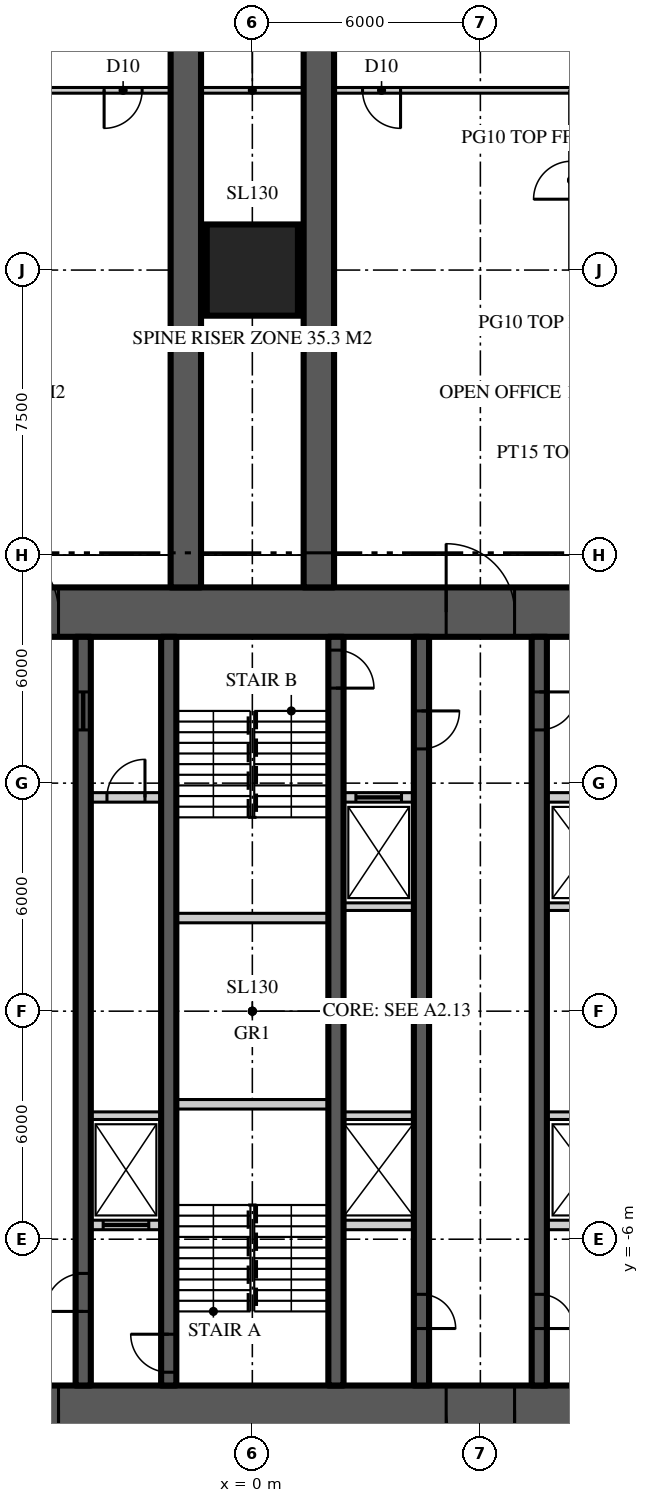
"""IFC4 building model, lengths in metres.
Left out: names, types, materials, properties, quantities, classifications, styles, units other than length and angle.
Written with IfcOpenShell. Run it as: python <this file> out.ifc"""

import sys

from ifc_helpers import new_model, si_unit, direction, frame, frame_2d, origin, origin_2d, place, context, subcontext, project, spatial, rectangle, extrude, element, fill, save


model = new_model("IFC4")
c1 = context("Model", 3, precision=1e-05, world=origin(), true_north=direction((0.0, 1.0)))
c2 = subcontext(c1, "Body", "Model", "MODEL_VIEW")
j1 = project(units=[si_unit("LENGTHUNIT", "METRE"), si_unit("PLANEANGLEUNIT", "RADIAN")], contexts=[c1])
p1 = place(None, origin())
s1 = spatial("IfcSite", under=j1, at=p1, CompositionType="ELEMENT")
p2 = place(p1, origin())
s2 = spatial("IfcBuilding", under=s1, at=p2, CompositionType="ELEMENT")
p3 = place(p2, frame((0.0, 0.0, 86.4)))
s3 = spatial("IfcBuildingStorey", under=s2, at=p3, CompositionType="ELEMENT", Elevation=86.4)
p4 = place(p3, frame((-11.15, 10.5, 0.0), z_axis=(0.0, 0.0, 1.0), x_axis=(1.0, 0.0, 0.0)))
e1 = element("IfcWall", 1, at=p4, inside=s3, PredefinedType="SHEAR", context=c2, shape_type="SweptSolid", body=[
    extrude(rectangle(XDim=22.3, YDim=1.3, at=frame_2d((11.15, 0.0))), origin(), (0.0, 0.0, 1.0), 3.9),
])
p5 = place(p4, frame((4.25, 0.0, 0.0)))
e2 = element("IfcOpeningElement", 2, at=p5, cuts=e1, PredefinedType="OPENING", context=c2, shape_type="SweptSolid", body=[
    extrude(rectangle(XDim=1.8, YDim=2.2, at=frame_2d((0.9, 1.1))), frame((0.0, 0.66, 0.0), z_axis=(0.0, -1.0, 0.0), x_axis=(1.0, 0.0, 0.0)), (0.0, 0.0, 1.0), 1.32),
])
p6 = place(p4, frame((16.25, 0.0, 0.0)))
e3 = element("IfcOpeningElement", 3, at=p6, cuts=e1, PredefinedType="OPENING", context=c2, shape_type="SweptSolid", body=[
    extrude(rectangle(XDim=1.8, YDim=2.2, at=frame_2d((0.9, 1.1))), frame((0.0, 0.66, 0.0), z_axis=(0.0, -1.0, 0.0), x_axis=(1.0, 0.0, 0.0)), (0.0, 0.0, 1.0), 1.32),
])
p7 = place(p3, frame((11.15, -10.5, 0.0), z_axis=(0.0, 0.0, 1.0), x_axis=(-1.0, 0.0, 0.0)))
e4 = element("IfcWall", 4, at=p7, inside=s3, PredefinedType="SHEAR", context=c2, shape_type="SweptSolid", body=[
    extrude(rectangle(XDim=22.3, YDim=1.3, at=frame_2d((11.15, 0.0))), origin(), (0.0, 0.0, 1.0), 3.9),
])
p8 = place(p7, frame((16.25, 0.0, 0.0)))
e5 = element("IfcOpeningElement", 5, at=p8, cuts=e4, PredefinedType="OPENING", context=c2, shape_type="SweptSolid", body=[
    extrude(rectangle(XDim=1.8, YDim=2.2, at=frame_2d((0.9, 1.1))), frame((0.0, 0.66, 0.0), z_axis=(0.0, -1.0, 0.0), x_axis=(1.0, 0.0, 0.0)), (0.0, 0.0, 1.0), 1.32),
])
p9 = place(p7, frame((4.25, 0.0, 0.0)))
e6 = element("IfcOpeningElement", 6, at=p9, cuts=e4, PredefinedType="OPENING", context=c2, shape_type="SweptSolid", body=[
    extrude(rectangle(XDim=1.8, YDim=2.2, at=frame_2d((0.9, 1.1))), frame((0.0, 0.66, 0.0), z_axis=(0.0, -1.0, 0.0), x_axis=(1.0, 0.0, 0.0)), (0.0, 0.0, 1.0), 1.32),
])
for number, where, z_axis, x_axis in (
    (7, (1.75, 11.15, 0.0), (0.0, 0.0, 1.0), (0.0, 1.0, 0.0)),
    (8, (-1.75, 11.15, 0.0), (0.0, 0.0, 1.0), (0.0, 1.0, 0.0)),
):
    element("IfcWall", number, at=place(p3, frame(where, z_axis=z_axis, x_axis=x_axis)), inside=s3, PredefinedType="SHEAR", context=c2, shape_type="SweptSolid", body=[
        extrude(rectangle(XDim=15.25, YDim=0.8, at=frame_2d((7.625, 0.0))), origin(), (0.0, 0.0, 1.0), 3.9),
    ])
p10 = place(p3, frame((0.0, 19.5, 0.0), z_axis=(0.0, 0.0, 1.0), x_axis=(1.0, 0.0, 0.0)))
e9 = element("IfcColumn", 9, at=p10, inside=s3, PredefinedType="COLUMN", context=c2, shape_type="SweptSolid", body=[
    extrude(rectangle(XDim=2.4, YDim=2.4, at=origin_2d()), origin(), (0.0, 0.0, 1.0), 3.9),
])
p11 = place(p3, frame((7.55, 9.85, 0.0), z_axis=(0.0, 0.0, 1.0), x_axis=(0.0, -1.0, 0.0)))
e10 = element("IfcWall", 10, at=p11, inside=s3, PredefinedType="SHEAR", context=c2, shape_type="SweptSolid", body=[
    extrude(rectangle(XDim=19.7, YDim=0.4, at=frame_2d((9.85, 0.0))), origin(), (0.0, 0.0, 1.0), 3.9),
])
p12 = place(p11, frame((1.45, 0.0, 0.0)))
e11 = element("IfcOpeningElement", 11, at=p12, cuts=e10, PredefinedType="OPENING", context=c2, shape_type="SweptSolid", body=[
    extrude(rectangle(XDim=1.0, YDim=2.2, at=frame_2d((0.5, 1.1))), frame((0.0, 0.21, 0.0), z_axis=(0.0, -1.0, 0.0), x_axis=(1.0, 0.0, 0.0)), (0.0, 0.0, 1.0), 0.42),
])
p13 = place(p11, frame((17.3, 0.0, 0.0)))
e12 = element("IfcOpeningElement", 12, at=p13, cuts=e10, PredefinedType="OPENING", context=c2, shape_type="SweptSolid", body=[
    extrude(rectangle(XDim=0.9, YDim=2.1, at=frame_2d((0.45, 1.05))), frame((0.0, 0.21, 0.0), z_axis=(0.0, -1.0, 0.0), x_axis=(1.0, 0.0, 0.0)), (0.0, 0.0, 1.0), 0.42),
])
p14 = place(p3, frame((-4.45, -9.85, 0.0), z_axis=(0.0, 0.0, 1.0), x_axis=(0.0, 1.0, 0.0)))
e13 = element("IfcWall", 13, at=p14, inside=s3, PredefinedType="SHEAR", context=c2, shape_type="SweptSolid", body=[
    extrude(rectangle(XDim=19.7, YDim=0.4, at=frame_2d((9.85, 0.0))), origin(), (0.0, 0.0, 1.0), 3.9),
])
p15 = place(p14, frame((1.95, 0.0, 0.0)))
e14 = element("IfcOpeningElement", 14, at=p15, cuts=e13, PredefinedType="OPENING", context=c2, shape_type="SweptSolid", body=[
    extrude(rectangle(XDim=1.0, YDim=2.2, at=frame_2d((0.5, 1.1))), frame((0.0, 0.21, 0.0), z_axis=(0.0, -1.0, 0.0), x_axis=(1.0, 0.0, 0.0)), (0.0, 0.0, 1.0), 0.42),
])
p16 = place(p14, frame((17.25, 0.0, 0.0)))
e15 = element("IfcOpeningElement", 15, at=p16, cuts=e13, PredefinedType="OPENING", context=c2, shape_type="SweptSolid", body=[
    extrude(rectangle(XDim=1.0, YDim=2.1, at=frame_2d((0.5, 1.05))), frame((0.0, 0.21, 0.0), z_axis=(0.0, -1.0, 0.0), x_axis=(1.0, 0.0, 0.0)), (0.0, 0.0, 1.0), 0.42),
])
p17 = place(p3, frame((4.45, 9.85, 0.0), z_axis=(0.0, 0.0, 1.0), x_axis=(0.0, -1.0, 0.0)))
e16 = element("IfcWall", 16, at=p17, inside=s3, PredefinedType="SHEAR", context=c2, shape_type="SweptSolid", body=[
    extrude(rectangle(XDim=19.7, YDim=0.4, at=frame_2d((9.85, 0.0))), origin(), (0.0, 0.0, 1.0), 3.9),
])
p18 = place(p17, frame((1.95, 0.0, 0.0)))
e17 = element("IfcOpeningElement", 17, at=p18, cuts=e16, PredefinedType="OPENING", context=c2, shape_type="SweptSolid", body=[
    extrude(rectangle(XDim=1.0, YDim=2.2, at=frame_2d((0.5, 1.1))), frame((0.0, 0.21, 0.0), z_axis=(0.0, -1.0, 0.0), x_axis=(1.0, 0.0, 0.0)), (0.0, 0.0, 1.0), 0.42),
])
p19 = place(p17, frame((17.3, 0.0, 0.0)))
e18 = element("IfcOpeningElement", 18, at=p19, cuts=e16, PredefinedType="OPENING", context=c2, shape_type="SweptSolid", body=[
    extrude(rectangle(XDim=0.9, YDim=2.1, at=frame_2d((0.45, 1.05))), frame((0.0, 0.21, 0.0), z_axis=(0.0, -1.0, 0.0), x_axis=(1.0, 0.0, 0.0)), (0.0, 0.0, 1.0), 0.42),
])
p20 = place(p3, frame((-2.2, -9.85, 0.0), z_axis=(0.0, 0.0, 1.0), x_axis=(0.0, 1.0, 0.0)))
e19 = element("IfcWall", 19, at=p20, inside=s3, PredefinedType="SHEAR", context=c2, shape_type="SweptSolid", body=[
    extrude(rectangle(XDim=19.7, YDim=0.4, at=frame_2d((9.85, 0.0))), origin(), (0.0, 0.0, 1.0), 3.9),
])
p21 = place(p20, frame((0.35, 0.0, 0.0)))
e20 = element("IfcOpeningElement", 20, at=p21, cuts=e19, PredefinedType="OPENING", context=c2, shape_type="SweptSolid", body=[
    extrude(rectangle(XDim=1.0, YDim=2.2, at=frame_2d((0.5, 1.1))), frame((0.0, 0.21, 0.0), z_axis=(0.0, -1.0, 0.0), x_axis=(1.0, 0.0, 0.0)), (0.0, 0.0, 1.0), 0.42),
])
p22 = place(p3, frame((2.2, 9.85, 0.0), z_axis=(0.0, 0.0, 1.0), x_axis=(0.0, -1.0, 0.0)))
e21 = element("IfcWall", 21, at=p22, inside=s3, PredefinedType="SHEAR", context=c2, shape_type="SweptSolid", body=[
    extrude(rectangle(XDim=19.7, YDim=0.4, at=frame_2d((9.85, 0.0))), origin(), (0.0, 0.0, 1.0), 3.9),
])
p23 = place(p22, frame((0.35, 0.0, 0.0)))
e22 = element("IfcOpeningElement", 22, at=p23, cuts=e21, PredefinedType="OPENING", context=c2, shape_type="SweptSolid", body=[
    extrude(rectangle(XDim=1.0, YDim=2.2, at=frame_2d((0.5, 1.1))), frame((0.0, 0.21, 0.0), z_axis=(0.0, -1.0, 0.0), x_axis=(1.0, 0.0, 0.0)), (0.0, 0.0, 1.0), 0.42),
])
p24 = place(p3, frame((-4.25, 5.625, 0.0), z_axis=(0.0, 0.0, 1.0), x_axis=(1.0, 0.0, 0.0)))
e23 = element("IfcWall", 23, at=p24, inside=s3, PredefinedType="SOLIDWALL", context=c2, shape_type="SweptSolid", body=[
    extrude(rectangle(XDim=1.85, YDim=0.25, at=frame_2d((0.925, 0.0))), origin(), (0.0, 0.0, 1.0), 3.7),
])
p25 = place(p24, frame((0.425, 0.0, 0.0)))
e24 = element("IfcOpeningElement", 24, at=p25, cuts=e23, PredefinedType="OPENING", context=c2, shape_type="SweptSolid", body=[
    extrude(rectangle(XDim=1.0, YDim=2.2, at=frame_2d((0.5, 1.1))), frame((0.0, 0.135, 0.0), z_axis=(0.0, -1.0, 0.0), x_axis=(1.0, 0.0, 0.0)), (0.0, 0.0, 1.0), 0.27),
])
p26 = place(p3, frame((2.4, 5.625, 0.0), z_axis=(0.0, 0.0, 1.0), x_axis=(1.0, 0.0, 0.0)))
e25 = element("IfcWall", 25, at=p26, inside=s3, PredefinedType="SOLIDWALL", context=c2, shape_type="SweptSolid", body=[
    extrude(rectangle(XDim=1.85, YDim=0.25, at=frame_2d((0.925, 0.0))), origin(), (0.0, 0.0, 1.0), 3.7),
])
p27 = place(p26, frame((0.325, 0.0, 0.0)))
e26 = element("IfcOpeningElement", 26, at=p27, cuts=e25, PredefinedType="OPENING", context=c2, shape_type="SweptSolid", body=[
    extrude(rectangle(XDim=1.2, YDim=2.2, at=frame_2d((0.6, 1.1))), frame((0.0, 0.135, 0.0), z_axis=(0.0, -1.0, 0.0), x_axis=(1.0, 0.0, 0.0)), (0.0, 0.0, 1.0), 0.27),
])
p28 = place(p3, frame((7.75, 5.625, 0.0), z_axis=(0.0, 0.0, 1.0), x_axis=(1.0, 0.0, 0.0)))
e27 = element("IfcWall", 27, at=p28, inside=s3, PredefinedType="SOLIDWALL", context=c2, shape_type="SweptSolid", body=[
    extrude(rectangle(XDim=2.1, YDim=0.25, at=frame_2d((1.05, 0.0))), origin(), (0.0, 0.0, 1.0), 3.7),
])
p29 = place(p3, frame((-4.25, -5.625, 0.0), z_axis=(0.0, 0.0, 1.0), x_axis=(1.0, 0.0, 0.0)))
e28 = element("IfcWall", 28, at=p29, inside=s3, PredefinedType="SOLIDWALL", context=c2, shape_type="SweptSolid", body=[
    extrude(rectangle(XDim=1.85, YDim=0.25, at=frame_2d((0.925, 0.0))), origin(), (0.0, 0.0, 1.0), 3.7),
])
p30 = place(p29, frame((0.325, 0.0, 0.0)))
e29 = element("IfcOpeningElement", 29, at=p30, cuts=e28, PredefinedType="OPENING", context=c2, shape_type="SweptSolid", body=[
    extrude(rectangle(XDim=1.2, YDim=2.2, at=frame_2d((0.6, 1.1))), frame((0.0, 0.135, 0.0), z_axis=(0.0, -1.0, 0.0), x_axis=(1.0, 0.0, 0.0)), (0.0, 0.0, 1.0), 0.27),
])
p31 = place(p3, frame((2.4, -5.625, 0.0), z_axis=(0.0, 0.0, 1.0), x_axis=(1.0, 0.0, 0.0)))
e30 = element("IfcWall", 30, at=p31, inside=s3, PredefinedType="SOLIDWALL", context=c2, shape_type="SweptSolid", body=[
    extrude(rectangle(XDim=1.85, YDim=0.25, at=frame_2d((0.925, 0.0))), origin(), (0.0, 0.0, 1.0), 3.7),
])
p32 = place(p3, frame((7.75, -5.625, 0.0), z_axis=(0.0, 0.0, 1.0), x_axis=(1.0, 0.0, 0.0)))
e31 = element("IfcWall", 31, at=p32, inside=s3, PredefinedType="SOLIDWALL", context=c2, shape_type="SweptSolid", body=[
    extrude(rectangle(XDim=2.1, YDim=0.25, at=frame_2d((1.05, 0.0))), origin(), (0.0, 0.0, 1.0), 3.7),
])
for number, where, z_axis, x_axis in (
    (32, (-2.0, -2.45, 0.0), (0.0, 0.0, 1.0), (1.0, 0.0, 0.0)),
    (33, (-2.0, 2.45, 0.0), (0.0, 0.0, 1.0), (1.0, 0.0, 0.0)),
):
    element("IfcWall", number, at=place(p3, frame(where, z_axis=z_axis, x_axis=x_axis)), inside=s3, PredefinedType="SOLIDWALL", context=c2, shape_type="SweptSolid", body=[
        extrude(rectangle(XDim=4.0, YDim=0.25, at=frame_2d((2.0, 0.0))), origin(), (0.0, 0.0, 1.0), 3.7),
    ])
for number, where, z_axis, x_axis in (
    (34, (-4.25, -2.75, 0.0), (0.0, 0.0, 1.0), (1.0, 0.0, 0.0)),
    (35, (2.4, -2.75, 0.0), (0.0, 0.0, 1.0), (1.0, 0.0, 0.0)),
):
    element("IfcWall", number, at=place(p3, frame(where, z_axis=z_axis, x_axis=x_axis)), inside=s3, PredefinedType="SOLIDWALL", context=c2, shape_type="SweptSolid", body=[
        extrude(rectangle(XDim=1.85, YDim=0.2, at=frame_2d((0.925, 0.0))), origin(), (0.0, 0.0, 1.0), 3.7),
    ])
p33 = place(p3, frame((7.75, -2.75, 0.0), z_axis=(0.0, 0.0, 1.0), x_axis=(1.0, 0.0, 0.0)))
e36 = element("IfcWall", 36, at=p33, inside=s3, PredefinedType="SOLIDWALL", context=c2, shape_type="SweptSolid", body=[
    extrude(rectangle(XDim=2.1, YDim=0.2, at=frame_2d((1.05, 0.0))), origin(), (0.0, 0.0, 1.0), 3.7),
])
p34 = place(p3, frame((2.4, 2.75, 0.0), z_axis=(0.0, 0.0, 1.0), x_axis=(1.0, 0.0, 0.0)))
e37 = element("IfcWall", 37, at=p34, inside=s3, PredefinedType="SOLIDWALL", context=c2, shape_type="SweptSolid", body=[
    extrude(rectangle(XDim=1.85, YDim=0.2, at=frame_2d((0.925, 0.0))), origin(), (0.0, 0.0, 1.0), 3.7),
])
p35 = place(p3, frame((7.75, 2.75, 0.0), z_axis=(0.0, 0.0, 1.0), x_axis=(1.0, 0.0, 0.0)))
e38 = element("IfcWall", 38, at=p35, inside=s3, PredefinedType="SOLIDWALL", context=c2, shape_type="SweptSolid", body=[
    extrude(rectangle(XDim=2.1, YDim=0.2, at=frame_2d((1.05, 0.0))), origin(), (0.0, 0.0, 1.0), 3.7),
])
p36 = place(p3, frame((12.82, 24.229, 0.0), z_axis=(0.0, 0.0, 1.0), x_axis=(-1.0, 0.0, 0.0)))
e39 = element("IfcWall", 39, at=p36, inside=s3, PredefinedType="PARTITIONING", context=c2, shape_type="SweptSolid", body=[
    extrude(rectangle(XDim=25.64, YDim=0.15, at=frame_2d((12.82, 0.0))), origin(), (0.0, 0.0, 1.0), 3.77),
])
p37 = place(p36, frame((15.72, 0.0, 0.0)))
e40 = element("IfcOpeningElement", 40, at=p37, cuts=e39, PredefinedType="OPENING", context=c2, shape_type="SweptSolid", body=[
    extrude(rectangle(XDim=1.0, YDim=2.2, at=frame_2d((0.5, 1.1))), frame((0.0, 0.085, 0.0), z_axis=(0.0, -1.0, 0.0), x_axis=(1.0, 0.0, 0.0)), (0.0, 0.0, 1.0), 0.17),
])
p38 = place(p36, frame((8.92, 0.0, 0.0)))
e41 = element("IfcOpeningElement", 41, at=p38, cuts=e39, PredefinedType="OPENING", context=c2, shape_type="SweptSolid", body=[
    extrude(rectangle(XDim=1.0, YDim=2.2, at=frame_2d((0.5, 1.1))), frame((0.0, 0.085, 0.0), z_axis=(0.0, -1.0, 0.0), x_axis=(1.0, 0.0, 0.0)), (0.0, 0.0, 1.0), 0.17),
])
p39 = place(p3, frame((8.4, 19.5, 0.0), z_axis=(0.0, 0.0, 1.0), x_axis=(0.0, 1.0, 0.0)))
e42 = element("IfcWall", 42, at=p39, inside=s3, PredefinedType="PARTITIONING", context=c2, shape_type="SweptSolid", body=[
    extrude(rectangle(XDim=4.729, YDim=0.1, at=frame_2d((2.365, 0.0))), origin(), (0.0, 0.0, 1.0), 3.77),
])
p40 = place(p39, frame((1.865, 0.0, 0.0)))
e43 = element("IfcOpeningElement", 43, at=p40, cuts=e42, PredefinedType="OPENING", context=c2, shape_type="SweptSolid", body=[
    extrude(rectangle(XDim=1.0, YDim=2.2, at=frame_2d((0.5, 1.1))), frame((0.0, 0.06, 0.0), z_axis=(0.0, -1.0, 0.0), x_axis=(1.0, 0.0, 0.0)), (0.0, 0.0, 1.0), 0.12),
])
p41 = place(p5, origin())
e44 = element("IfcDoor", 44, at=p41, inside=s3, OperationType="DOUBLE_DOOR_DOUBLE_SWING", PredefinedType="DOOR", context=c2, shape_type="SweptSolid", body=[
    extrude(rectangle(XDim=1.8, YDim=2.2, at=frame_2d((0.9, 1.1))), frame((0.0, 0.025, 0.0), z_axis=(0.0, -1.0, 0.0), x_axis=(1.0, 0.0, 0.0)), (0.0, 0.0, 1.0), 0.05),
])
fill(e2, e44)
p42 = place(p8, origin())
e45 = element("IfcDoor", 45, at=p42, inside=s3, OperationType="DOUBLE_DOOR_DOUBLE_SWING", PredefinedType="DOOR", context=c2, shape_type="SweptSolid", body=[
    extrude(rectangle(XDim=1.8, YDim=2.2, at=frame_2d((0.9, 1.1))), frame((0.0, 0.025, 0.0), z_axis=(0.0, -1.0, 0.0), x_axis=(1.0, 0.0, 0.0)), (0.0, 0.0, 1.0), 0.05),
])
fill(e5, e45)
p43 = place(p6, origin())
e46 = element("IfcDoor", 46, at=p43, inside=s3, OperationType="DOUBLE_DOOR_DOUBLE_SWING", PredefinedType="DOOR", context=c2, shape_type="SweptSolid", body=[
    extrude(rectangle(XDim=1.8, YDim=2.2, at=frame_2d((0.9, 1.1))), frame((0.0, 0.025, 0.0), z_axis=(0.0, -1.0, 0.0), x_axis=(1.0, 0.0, 0.0)), (0.0, 0.0, 1.0), 0.05),
])
fill(e3, e46)
p44 = place(p9, origin())
e47 = element("IfcDoor", 47, at=p44, inside=s3, OperationType="DOUBLE_DOOR_DOUBLE_SWING", PredefinedType="DOOR", context=c2, shape_type="SweptSolid", body=[
    extrude(rectangle(XDim=1.8, YDim=2.2, at=frame_2d((0.9, 1.1))), frame((0.0, 0.025, 0.0), z_axis=(0.0, -1.0, 0.0), x_axis=(1.0, 0.0, 0.0)), (0.0, 0.0, 1.0), 0.05),
])
fill(e6, e47)
p45 = place(p12, origin())
e48 = element("IfcDoor", 48, at=p45, inside=s3, OperationType="SINGLE_SWING_LEFT", PredefinedType="DOOR", context=c2, shape_type="SweptSolid", body=[
    extrude(rectangle(XDim=1.0, YDim=2.2, at=frame_2d((0.5, 1.1))), frame((0.0, 0.025, 0.0), z_axis=(0.0, -1.0, 0.0), x_axis=(1.0, 0.0, 0.0)), (0.0, 0.0, 1.0), 0.05),
])
fill(e11, e48)
p46 = place(p15, origin())
e49 = element("IfcDoor", 49, at=p46, inside=s3, OperationType="SINGLE_SWING_LEFT", PredefinedType="DOOR", context=c2, shape_type="SweptSolid", body=[
    extrude(rectangle(XDim=1.0, YDim=2.2, at=frame_2d((0.5, 1.1))), frame((0.0, 0.025, 0.0), z_axis=(0.0, -1.0, 0.0), x_axis=(1.0, 0.0, 0.0)), (0.0, 0.0, 1.0), 0.05),
])
fill(e14, e49)
p47 = place(p21, origin())
e50 = element("IfcDoor", 50, at=p47, inside=s3, OperationType="SINGLE_SWING_RIGHT", PredefinedType="DOOR", context=c2, shape_type="SweptSolid", body=[
    extrude(rectangle(XDim=1.0, YDim=2.2, at=frame_2d((0.5, 1.1))), frame((0.0, 0.025, 0.0), z_axis=(0.0, -1.0, 0.0), x_axis=(1.0, 0.0, 0.0)), (0.0, 0.0, 1.0), 0.05),
])
fill(e20, e50)
p48 = place(p18, origin())
e51 = element("IfcDoor", 51, at=p48, inside=s3, OperationType="SINGLE_SWING_LEFT", PredefinedType="DOOR", context=c2, shape_type="SweptSolid", body=[
    extrude(rectangle(XDim=1.0, YDim=2.2, at=frame_2d((0.5, 1.1))), frame((0.0, 0.025, 0.0), z_axis=(0.0, -1.0, 0.0), x_axis=(1.0, 0.0, 0.0)), (0.0, 0.0, 1.0), 0.05),
])
fill(e17, e51)
p49 = place(p23, origin())
e52 = element("IfcDoor", 52, at=p49, inside=s3, OperationType="SINGLE_SWING_RIGHT", PredefinedType="DOOR", context=c2, shape_type="SweptSolid", body=[
    extrude(rectangle(XDim=1.0, YDim=2.2, at=frame_2d((0.5, 1.1))), frame((0.0, 0.025, 0.0), z_axis=(0.0, -1.0, 0.0), x_axis=(1.0, 0.0, 0.0)), (0.0, 0.0, 1.0), 0.05),
])
fill(e22, e52)
p50 = place(p16, origin())
e53 = element("IfcDoor", 53, at=p50, inside=s3, OperationType="SLIDING_TO_LEFT", PredefinedType="DOOR", context=c2, shape_type="SweptSolid", body=[
    extrude(rectangle(XDim=1.0, YDim=2.1, at=frame_2d((0.5, 1.05))), frame((0.0, 0.025, 0.0), z_axis=(0.0, -1.0, 0.0), x_axis=(1.0, 0.0, 0.0)), (0.0, 0.0, 1.0), 0.05),
])
fill(e15, e53)
p51 = place(p13, origin())
e54 = element("IfcDoor", 54, at=p51, inside=s3, OperationType="SINGLE_SWING_RIGHT", PredefinedType="DOOR", context=c2, shape_type="SweptSolid", body=[
    extrude(rectangle(XDim=0.9, YDim=2.1, at=frame_2d((0.45, 1.05))), frame((0.0, 0.025, 0.0), z_axis=(0.0, -1.0, 0.0), x_axis=(1.0, 0.0, 0.0)), (0.0, 0.0, 1.0), 0.05),
])
fill(e12, e54)
p52 = place(p19, origin())
e55 = element("IfcDoor", 55, at=p52, inside=s3, OperationType="SINGLE_SWING_RIGHT", PredefinedType="DOOR", context=c2, shape_type="SweptSolid", body=[
    extrude(rectangle(XDim=0.9, YDim=2.1, at=frame_2d((0.45, 1.05))), frame((0.0, 0.025, 0.0), z_axis=(0.0, -1.0, 0.0), x_axis=(1.0, 0.0, 0.0)), (0.0, 0.0, 1.0), 0.05),
])
fill(e18, e55)
p53 = place(p30, origin())
e56 = element("IfcDoor", 56, at=p53, inside=s3, OperationType="SLIDING_TO_LEFT", PredefinedType="DOOR", context=c2, shape_type="SweptSolid", body=[
    extrude(rectangle(XDim=1.2, YDim=2.2, at=frame_2d((0.6, 1.1))), frame((0.0, 0.025, 0.0), z_axis=(0.0, -1.0, 0.0), x_axis=(1.0, 0.0, 0.0)), (0.0, 0.0, 1.0), 0.05),
])
fill(e29, e56)
p54 = place(p27, origin())
e57 = element("IfcDoor", 57, at=p54, inside=s3, OperationType="SLIDING_TO_LEFT", PredefinedType="DOOR", context=c2, shape_type="SweptSolid", body=[
    extrude(rectangle(XDim=1.2, YDim=2.2, at=frame_2d((0.6, 1.1))), frame((0.0, 0.025, 0.0), z_axis=(0.0, -1.0, 0.0), x_axis=(1.0, 0.0, 0.0)), (0.0, 0.0, 1.0), 0.05),
])
fill(e26, e57)
p55 = place(p37, origin())
e58 = element("IfcDoor", 58, at=p55, inside=s3, OperationType="SINGLE_SWING_RIGHT", PredefinedType="DOOR", context=c2, shape_type="SweptSolid", body=[
    extrude(rectangle(XDim=1.0, YDim=2.2, at=frame_2d((0.5, 1.1))), frame((0.0, 0.025, 0.0), z_axis=(0.0, -1.0, 0.0), x_axis=(1.0, 0.0, 0.0)), (0.0, 0.0, 1.0), 0.05),
])
fill(e40, e58)
p56 = place(p38, origin())
e59 = element("IfcDoor", 59, at=p56, inside=s3, OperationType="SINGLE_SWING_LEFT", PredefinedType="DOOR", context=c2, shape_type="SweptSolid", body=[
    extrude(rectangle(XDim=1.0, YDim=2.2, at=frame_2d((0.5, 1.1))), frame((0.0, 0.025, 0.0), z_axis=(0.0, -1.0, 0.0), x_axis=(1.0, 0.0, 0.0)), (0.0, 0.0, 1.0), 0.05),
])
fill(e41, e59)
p57 = place(p25, origin())
e60 = element("IfcDoor", 60, at=p57, inside=s3, OperationType="SINGLE_SWING_RIGHT", PredefinedType="DOOR", context=c2, shape_type="SweptSolid", body=[
    extrude(rectangle(XDim=1.0, YDim=2.2, at=frame_2d((0.5, 1.1))), frame((0.0, 0.025, 0.0), z_axis=(0.0, -1.0, 0.0), x_axis=(1.0, 0.0, 0.0)), (0.0, 0.0, 1.0), 0.05),
])
fill(e24, e60)
save(model, sys.argv[1])
